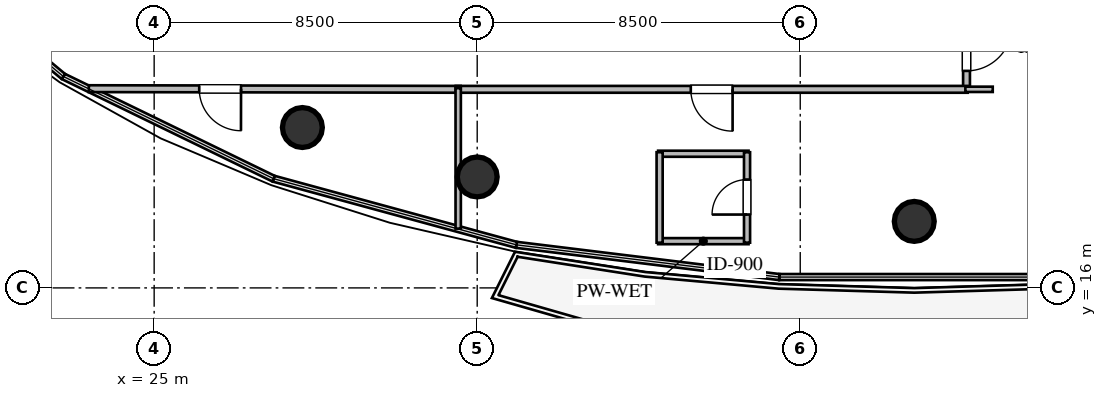
"""IFC4 building model, lengths in metres.
Left out: names, types, materials, properties, quantities, classifications, styles, units other than length and angle.
Written with IfcOpenShell. Run it as: python <this file> out.ifc"""

import sys

from ifc_helpers import new_model, si_unit, direction, frame, frame_2d, origin, origin_2d, place, context, subcontext, project, spatial, rectangle, circle, extrude, element, fill, save


model = new_model("IFC4")
c1 = context("Model", 3, precision=1e-05, world=origin(), true_north=direction((0.0, 1.0)))
c2 = subcontext(c1, "Body", "Model", "MODEL_VIEW")
j1 = project(units=[si_unit("LENGTHUNIT", "METRE"), si_unit("PLANEANGLEUNIT", "RADIAN")], contexts=[c1])
p1 = place(None, origin())
s1 = spatial("IfcSite", under=j1, at=p1, CompositionType="ELEMENT")
p2 = place(p1, origin())
s2 = spatial("IfcBuilding", under=s1, at=p2, CompositionType="ELEMENT")
p3 = place(p2, frame((0.0, 0.0, 187.2)))
s3 = spatial("IfcBuildingStorey", under=s2, at=p3, CompositionType="ELEMENT", Elevation=187.2)
for number, where, z_axis, x_axis in (
    (1, (28.9, 20.22, -0.24), (0.0, 0.0, 1.0), (1.0, 0.0, 0.0)),
    (2, (33.5, 18.92, -0.24), (0.0, 0.0, 1.0), (1.0, 0.0, 0.0)),
    (3, (45.0, 17.75, -0.24), (0.0, 0.0, 1.0), (1.0, 0.0, 0.0)),
):
    element("IfcColumn", number, at=place(p3, frame(where, z_axis=z_axis, x_axis=x_axis)), inside=s3, PredefinedType="COLUMN", context=c2, shape_type="SweptSolid", body=[
        extrude(circle(Radius=0.525, at=origin_2d()), origin(), (0.0, 0.0, 1.0), 3.84),
    ])
for number, where, z_axis, x_axis in (
    (4, (38.26, 17.23, 0.0), (0.0, 0.0, 1.0), (1.0, 0.0, 0.0)),
    (5, (38.26, 19.53, 0.0), (0.0, 0.0, 1.0), (1.0, 0.0, 0.0)),
):
    element("IfcWall", number, at=place(p3, frame(where, z_axis=z_axis, x_axis=x_axis)), inside=s3, PredefinedType="PLUMBINGWALL", context=c2, shape_type="SweptSolid", body=[
        extrude(rectangle(XDim=2.38, YDim=0.16, at=frame_2d((1.19, 0.0))), origin(), (0.0, 0.0, 1.0), 3.28),
    ])
p4 = place(p3, frame((38.3, 17.19, 0.0), z_axis=(0.0, 0.0, 1.0), x_axis=(0.0, 1.0, 0.0)))
e6 = element("IfcWall", 6, at=p4, inside=s3, PredefinedType="PLUMBINGWALL", context=c2, shape_type="SweptSolid", body=[
    extrude(rectangle(XDim=2.38, YDim=0.16, at=frame_2d((1.19, 0.0))), origin(), (0.0, 0.0, 1.0), 3.28),
])
p5 = place(p3, frame((40.6, 17.19, 0.0), z_axis=(0.0, 0.0, 1.0), x_axis=(0.0, 1.0, 0.0)))
e7 = element("IfcWall", 7, at=p5, inside=s3, PredefinedType="PLUMBINGWALL", context=c2, shape_type="SweptSolid", body=[
    extrude(rectangle(XDim=2.38, YDim=0.16, at=frame_2d((1.19, 0.0))), origin(), (0.0, 0.0, 1.0), 3.28),
])
p6 = place(p5, frame((0.74, 0.0, 0.0)))
e8 = element("IfcOpeningElement", 8, at=p6, cuts=e7, PredefinedType="OPENING", context=c2, shape_type="SweptSolid", body=[
    extrude(rectangle(XDim=0.92, YDim=2.1, at=frame_2d((0.46, 1.05))), frame((0.0, 0.09, 0.0), z_axis=(0.0, -1.0, 0.0), x_axis=(1.0, 0.0, 0.0)), (0.0, 0.0, 1.0), 0.18),
])
p7 = place(p3, frame((46.375, 23.425, 0.0), z_axis=(0.0, 0.0, 1.0), x_axis=(0.0, -1.0, 0.0)))
e9 = element("IfcWall", 9, at=p7, inside=s3, PredefinedType="PARTITIONING", context=c2, shape_type="SweptSolid", body=[
    extrude(rectangle(XDim=2.23, YDim=0.18, at=frame_2d((1.115, 0.0))), origin(), (0.0, 0.0, 1.0), 3.28),
])
p8 = place(p7, frame((0.515, 0.0, 0.0)))
e10 = element("IfcOpeningElement", 10, at=p8, cuts=e9, PredefinedType="OPENING", context=c2, shape_type="SweptSolid", body=[
    extrude(rectangle(XDim=1.2, YDim=2.15, at=frame_2d((0.6, 1.075))), frame((0.0, 0.1, 0.0), z_axis=(0.0, -1.0, 0.0), x_axis=(1.0, 0.0, 0.0)), (0.0, 0.0, 1.0), 0.2),
])
p9 = place(p3, frame((33.065, 21.225, 0.0), z_axis=(0.0, 0.0, 1.0), x_axis=(-0.99999847448, 0.001746722226, 0.0)))
e11 = element("IfcWall", 11, at=p9, inside=s3, PredefinedType="PARTITIONING", context=c2, shape_type="SweptSolid", body=[
    extrude(rectangle(XDim=9.784, YDim=0.18, at=frame_2d((4.892, 0.0))), origin(), (0.0, 0.0, 1.0), 2.81),
])
p10 = place(p9, frame((5.779, 0.0, 0.0)))
e12 = element("IfcOpeningElement", 12, at=p10, cuts=e11, PredefinedType="OPENING", context=c2, shape_type="SweptSolid", body=[
    extrude(rectangle(XDim=1.1, YDim=2.1, at=frame_2d((0.55, 1.05))), frame((0.0, 0.1, 0.0), z_axis=(0.0, -1.0, 0.0), x_axis=(1.0, 0.0, 0.0)), (0.0, 0.0, 1.0), 0.2),
])
p11 = place(p3, frame((46.405, 21.225, 0.0), z_axis=(0.0, 0.0, 1.0), x_axis=(-1.0, 0.0, 0.0)))
e13 = element("IfcWall", 13, at=p11, inside=s3, PredefinedType="PARTITIONING", context=c2, shape_type="SweptSolid", body=[
    extrude(rectangle(XDim=13.47, YDim=0.18, at=frame_2d((6.735, 0.0))), origin(), (0.0, 0.0, 1.0), 2.916),
])
p12 = place(p11, frame((6.185, 0.0, 0.0)))
e14 = element("IfcOpeningElement", 14, at=p12, cuts=e13, PredefinedType="OPENING", context=c2, shape_type="SweptSolid", body=[
    extrude(rectangle(XDim=1.1, YDim=2.1, at=frame_2d((0.55, 1.05))), frame((0.0, 0.1, 0.0), z_axis=(0.0, -1.0, 0.0), x_axis=(1.0, 0.0, 0.0)), (0.0, 0.0, 1.0), 0.2),
])
p13 = place(p3, frame((47.065, 21.225, 0.0), z_axis=(0.0, 0.0, 1.0), x_axis=(-1.0, 0.0, 0.0)))
e15 = element("IfcWall", 15, at=p13, inside=s3, PredefinedType="PARTITIONING", context=c2, shape_type="SweptSolid", body=[
    extrude(rectangle(XDim=0.72, YDim=0.14, at=frame_2d((0.36, 0.0))), origin(), (0.0, 0.0, 1.0), 2.916),
])
p14 = place(p3, frame((33.0, 21.255, 0.0), z_axis=(0.0, 0.0, 1.0), x_axis=(0.0, -1.0, 0.0)))
e16 = element("IfcWall", 16, at=p14, inside=s3, PredefinedType="PARTITIONING", context=c2, shape_type="SweptSolid", body=[
    extrude(rectangle(XDim=3.695, YDim=0.14, at=frame_2d((1.847, 0.0))), origin(), (0.0, 0.0, 1.0), 3.28),
])
p15 = place(p6, origin())
e17 = element("IfcDoor", 17, at=p15, inside=s3, OperationType="SINGLE_SWING_LEFT", PredefinedType="DOOR", context=c2, shape_type="SweptSolid", body=[
    extrude(rectangle(XDim=0.92, YDim=2.1, at=frame_2d((0.46, 1.05))), frame((0.0, 0.025, 0.0), z_axis=(0.0, -1.0, 0.0), x_axis=(1.0, 0.0, 0.0)), (0.0, 0.0, 1.0), 0.05),
])
fill(e8, e17)
p16 = place(p8, origin())
e18 = element("IfcDoor", 18, at=p16, inside=s3, OperationType="SINGLE_SWING_LEFT", PredefinedType="DOOR", context=c2, shape_type="SweptSolid", body=[
    extrude(rectangle(XDim=1.2, YDim=2.15, at=frame_2d((0.6, 1.075))), frame((0.0, 0.025, 0.0), z_axis=(0.0, -1.0, 0.0), x_axis=(1.0, 0.0, 0.0)), (0.0, 0.0, 1.0), 0.05),
])
fill(e10, e18)
p17 = place(p10, origin())
e19 = element("IfcDoor", 19, at=p17, inside=s3, OperationType="SINGLE_SWING_LEFT", PredefinedType="DOOR", context=c2, shape_type="SweptSolid", body=[
    extrude(rectangle(XDim=1.1, YDim=2.1, at=frame_2d((0.55, 1.05))), frame((0.0, 0.025, 0.0), z_axis=(0.0, -1.0, 0.0), x_axis=(1.0, 0.0, 0.0)), (0.0, 0.0, 1.0), 0.05),
])
fill(e12, e19)
p18 = place(p12, origin())
e20 = element("IfcDoor", 20, at=p18, inside=s3, OperationType="SINGLE_SWING_LEFT", PredefinedType="DOOR", context=c2, shape_type="SweptSolid", body=[
    extrude(rectangle(XDim=1.1, YDim=2.1, at=frame_2d((0.55, 1.05))), frame((0.0, 0.025, 0.0), z_axis=(0.0, -1.0, 0.0), x_axis=(1.0, 0.0, 0.0)), (0.0, 0.0, 1.0), 0.05),
])
fill(e14, e20)
save(model, sys.argv[1])
